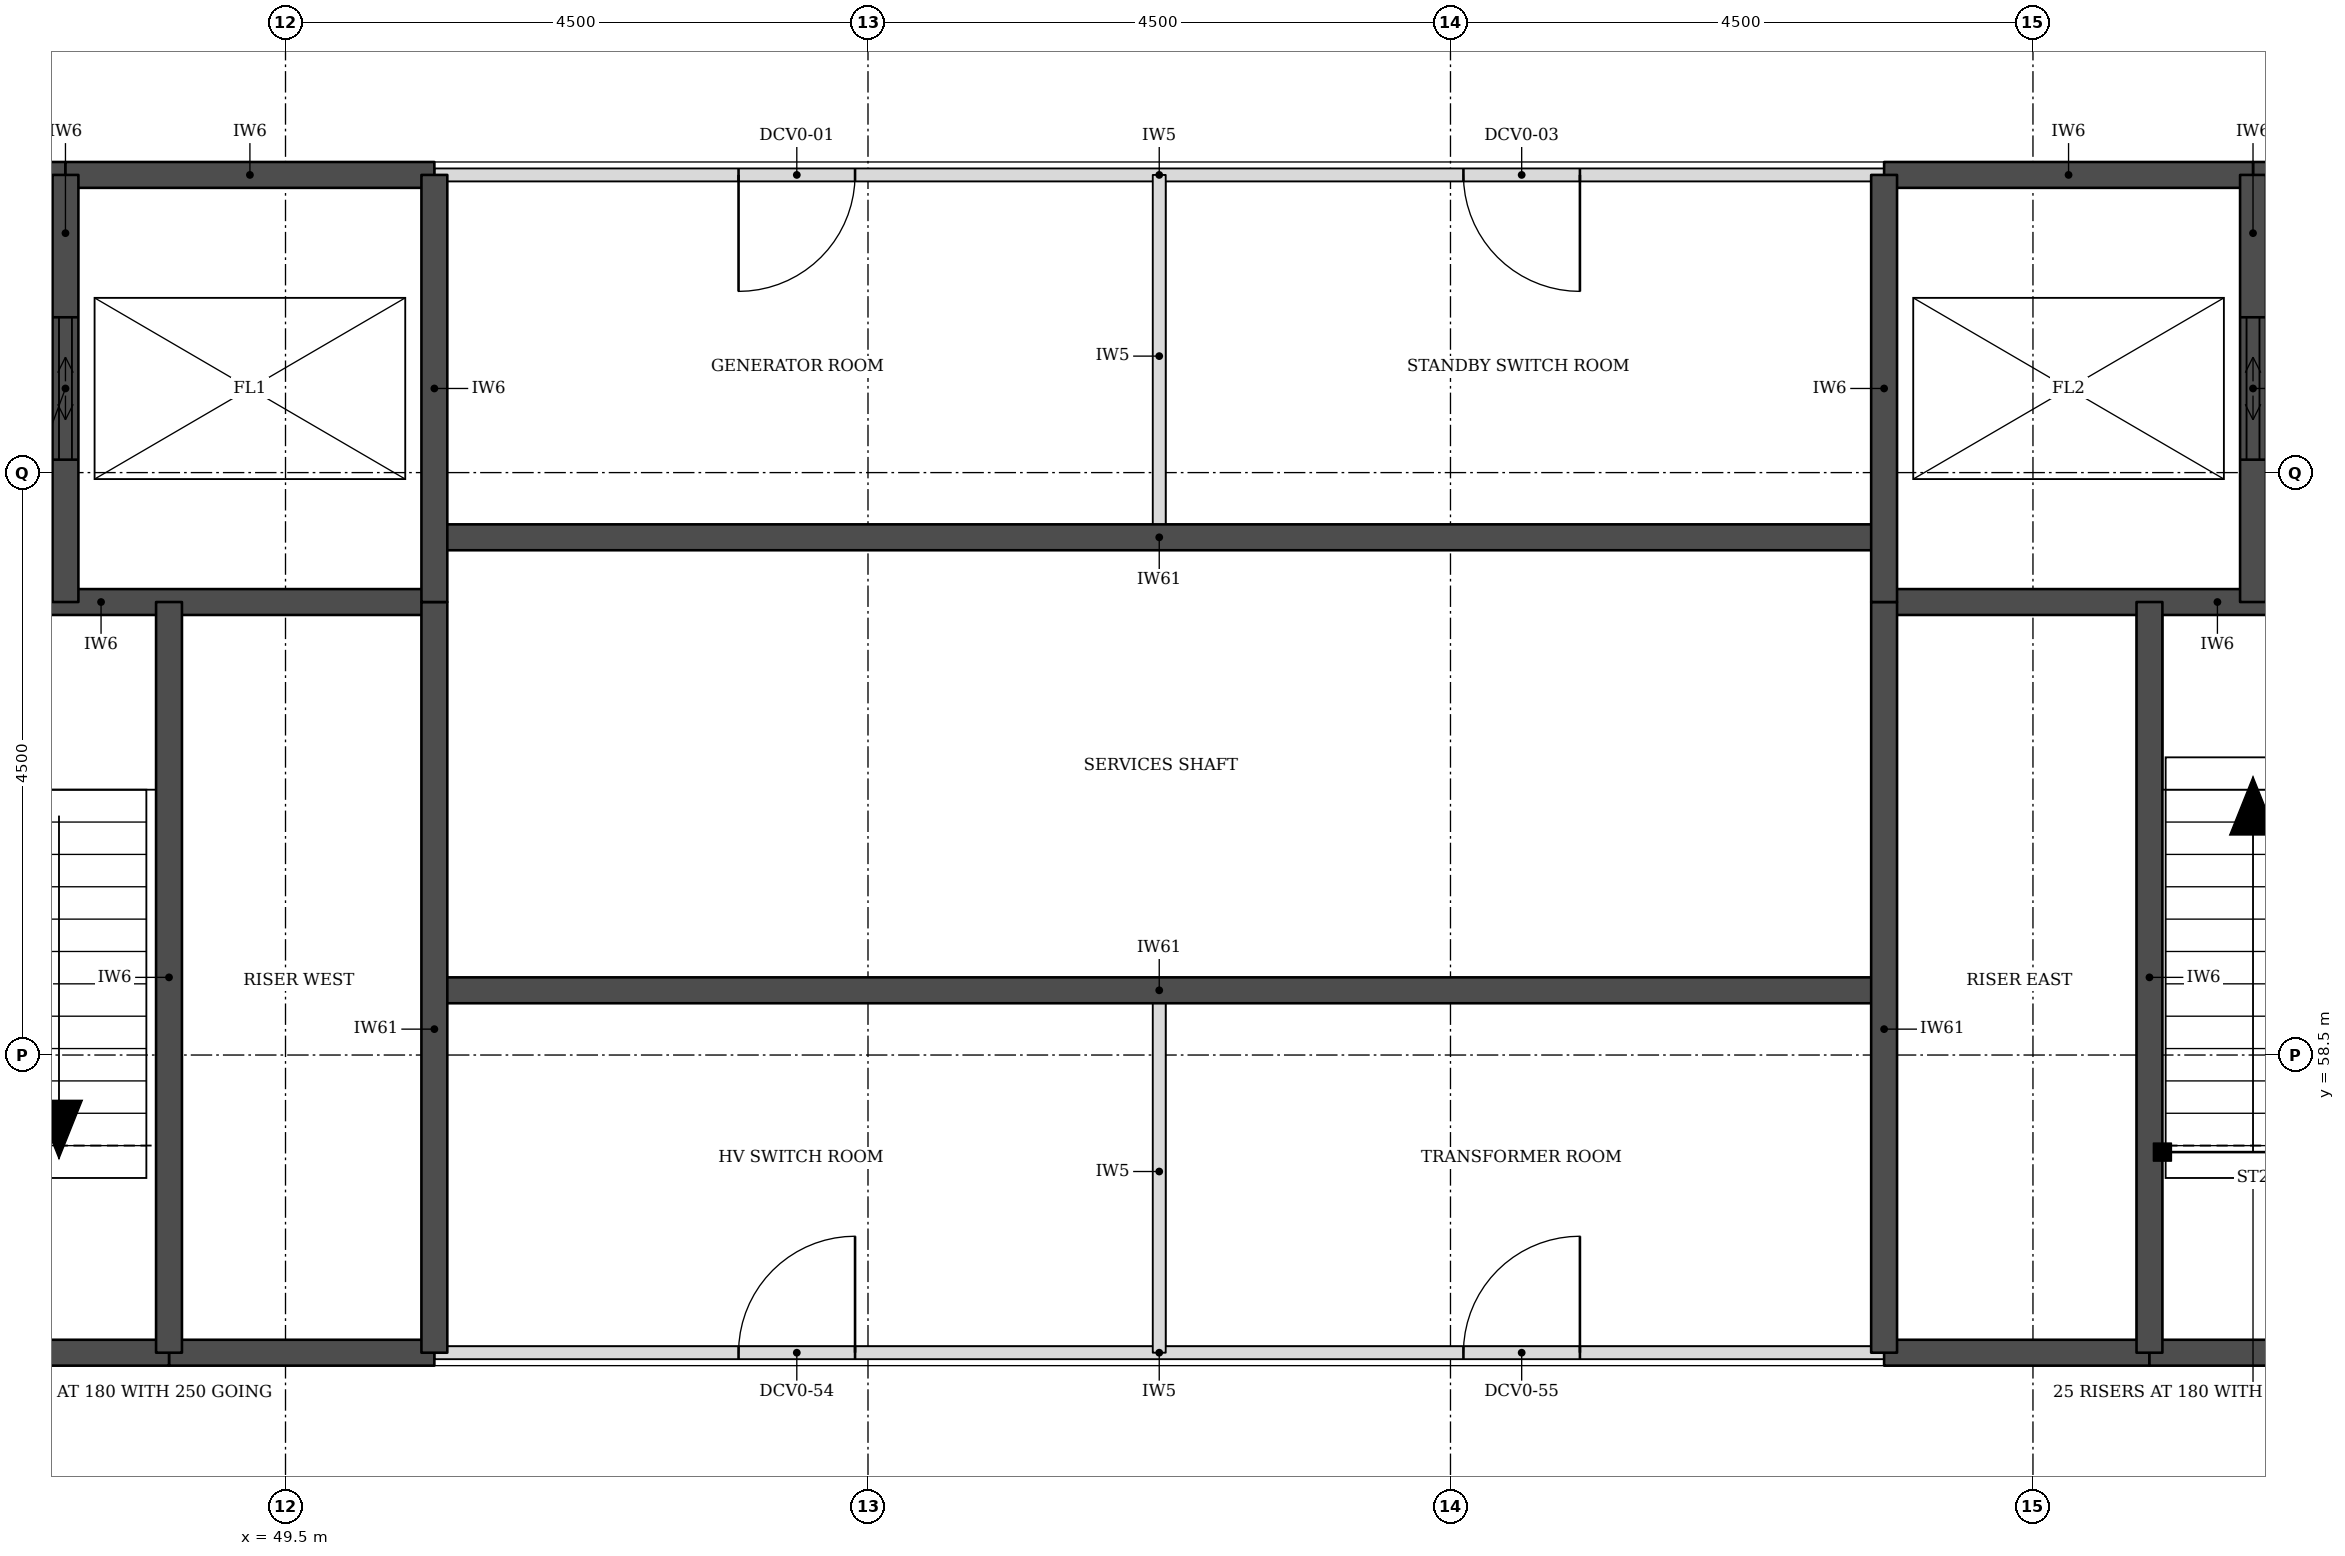
"""IFC4 building model, lengths in metres.
Left out: names, types, materials, properties, quantities, classifications, styles, units other than length and angle.
Written with IfcOpenShell. Run it as: python <this file> out.ifc"""

import sys

from ifc_helpers import new_model, si_unit, direction, frame, frame_2d, origin, place, context, subcontext, project, spatial, rectangle, extrude, element, fill, save


model = new_model("IFC4")
c1 = context("Model", 3, precision=1e-05, world=origin(), true_north=direction((0.0, 1.0)))
c2 = subcontext(c1, "Body", "Model", "MODEL_VIEW")
j1 = project(units=[si_unit("LENGTHUNIT", "METRE"), si_unit("PLANEANGLEUNIT", "RADIAN")], contexts=[c1])
p1 = place(None, origin())
s1 = spatial("IfcSite", under=j1, at=p1, CompositionType="ELEMENT")
p2 = place(p1, origin())
s2 = spatial("IfcBuilding", under=s1, at=p2, CompositionType="ELEMENT")
p3 = place(p2, frame((0.0, 0.0, -4.5)))
s3 = spatial("IfcBuildingStorey", under=s2, at=p3, CompositionType="ELEMENT", Elevation=-4.5)
p4 = place(p3, frame((50.65, 56.2, 0.0), z_axis=(0.0, 0.0, 1.0), x_axis=(1.0, 0.0, 0.0)))
e1 = element("IfcWall", 1, at=p4, inside=s3, PredefinedType="PARTITIONING", context=c2, shape_type="SweptSolid", body=[
    extrude(rectangle(XDim=11.2, YDim=0.1, at=frame_2d((5.6, 0.0))), origin(), (0.0, 0.0, 1.0), 4.1),
])
p5 = place(p4, frame((2.35, 0.0, 0.0)))
e2 = element("IfcOpeningElement", 2, at=p5, cuts=e1, PredefinedType="OPENING", context=c2, shape_type="SweptSolid", body=[
    extrude(rectangle(XDim=0.9, YDim=2.1, at=frame_2d((0.45, 1.05))), frame((0.0, 0.06, 0.0), z_axis=(0.0, -1.0, 0.0), x_axis=(1.0, 0.0, 0.0)), (0.0, 0.0, 1.0), 0.12),
])
p6 = place(p4, frame((7.95, 0.0, 0.0)))
e3 = element("IfcOpeningElement", 3, at=p6, cuts=e1, PredefinedType="OPENING", context=c2, shape_type="SweptSolid", body=[
    extrude(rectangle(XDim=0.9, YDim=2.1, at=frame_2d((0.45, 1.05))), frame((0.0, 0.06, 0.0), z_axis=(0.0, -1.0, 0.0), x_axis=(1.0, 0.0, 0.0)), (0.0, 0.0, 1.0), 0.12),
])
for number, where, z_axis, x_axis in (
    (4, (48.6, 56.2, 0.0), (0.0, 0.0, 1.0), (1.0, 0.0, 0.0)),
    (5, (61.85, 56.2, 0.0), (0.0, 0.0, 1.0), (1.0, 0.0, 0.0)),
):
    element("IfcWall", number, at=place(p3, frame(where, z_axis=z_axis, x_axis=x_axis)), inside=s3, PredefinedType="SOLIDWALL", context=c2, shape_type="SweptSolid", body=[
        extrude(rectangle(XDim=2.05, YDim=0.2, at=frame_2d((1.025, 0.0))), origin(), (0.0, 0.0, 1.0), 4.1),
    ])
for number, where, z_axis, x_axis in (
    (6, (45.5, 56.2, 0.0), (0.0, 0.0, 1.0), (1.0, 0.0, 0.0)),
    (7, (63.9, 56.2, 0.0), (0.0, 0.0, 1.0), (1.0, 0.0, 0.0)),
):
    element("IfcWall", number, at=place(p3, frame(where, z_axis=z_axis, x_axis=x_axis)), inside=s3, PredefinedType="SOLIDWALL", context=c2, shape_type="SweptSolid", body=[
        extrude(rectangle(XDim=3.1, YDim=0.2, at=frame_2d((1.55, 0.0))), origin(), (0.0, 0.0, 1.0), 4.1),
    ])
p7 = place(p3, frame((50.65, 59.0, 0.0), z_axis=(0.0, 0.0, 1.0), x_axis=(1.0, 0.0, 0.0)))
e8 = element("IfcWall", 8, at=p7, inside=s3, PredefinedType="SOLIDWALL", context=c2, shape_type="SweptSolid", body=[
    extrude(rectangle(XDim=11.2, YDim=0.2, at=frame_2d((5.6, 0.0))), origin(), (0.0, 0.0, 1.0), 4.5),
])
for number, where, z_axis, x_axis in (
    (9, (45.5, 62.0, 0.0), (0.0, 0.0, 1.0), (1.0, 0.0, 0.0)),
    (10, (61.85, 62.0, 0.0), (0.0, 0.0, 1.0), (1.0, 0.0, 0.0)),
):
    element("IfcWall", number, at=place(p3, frame(where, z_axis=z_axis, x_axis=x_axis)), inside=s3, PredefinedType="SOLIDWALL", context=c2, shape_type="SweptSolid", body=[
        extrude(rectangle(XDim=5.15, YDim=0.2, at=frame_2d((2.575, 0.0))), origin(), (0.0, 0.0, 1.0), 4.1),
    ])
p8 = place(p3, frame((50.65, 62.5, 0.0), z_axis=(0.0, 0.0, 1.0), x_axis=(1.0, 0.0, 0.0)))
e11 = element("IfcWall", 11, at=p8, inside=s3, PredefinedType="SOLIDWALL", context=c2, shape_type="SweptSolid", body=[
    extrude(rectangle(XDim=11.2, YDim=0.2, at=frame_2d((5.6, 0.0))), origin(), (0.0, 0.0, 1.0), 4.5),
])
p9 = place(p3, frame((50.65, 65.3, 0.0), z_axis=(0.0, 0.0, 1.0), x_axis=(1.0, 0.0, 0.0)))
e12 = element("IfcWall", 12, at=p9, inside=s3, PredefinedType="PARTITIONING", context=c2, shape_type="SweptSolid", body=[
    extrude(rectangle(XDim=11.2, YDim=0.1, at=frame_2d((5.6, 0.0))), origin(), (0.0, 0.0, 1.0), 4.1),
])
p10 = place(p9, frame((2.35, 0.0, 0.0)))
e13 = element("IfcOpeningElement", 13, at=p10, cuts=e12, PredefinedType="OPENING", context=c2, shape_type="SweptSolid", body=[
    extrude(rectangle(XDim=0.9, YDim=2.1, at=frame_2d((0.45, 1.05))), frame((0.0, 0.06, 0.0), z_axis=(0.0, -1.0, 0.0), x_axis=(1.0, 0.0, 0.0)), (0.0, 0.0, 1.0), 0.12),
])
p11 = place(p9, frame((7.95, 0.0, 0.0)))
e14 = element("IfcOpeningElement", 14, at=p11, cuts=e12, PredefinedType="OPENING", context=c2, shape_type="SweptSolid", body=[
    extrude(rectangle(XDim=0.9, YDim=2.1, at=frame_2d((0.45, 1.05))), frame((0.0, 0.06, 0.0), z_axis=(0.0, -1.0, 0.0), x_axis=(1.0, 0.0, 0.0)), (0.0, 0.0, 1.0), 0.12),
])
for number, where, z_axis, x_axis in (
    (15, (45.5, 65.3, 0.0), (0.0, 0.0, 1.0), (1.0, 0.0, 0.0)),
    (16, (64.7, 65.3, 0.0), (0.0, 0.0, 1.0), (1.0, 0.0, 0.0)),
):
    element("IfcWall", number, at=place(p3, frame(where, z_axis=z_axis, x_axis=x_axis)), inside=s3, PredefinedType="SOLIDWALL", context=c2, shape_type="SweptSolid", body=[
        extrude(rectangle(XDim=2.3, YDim=0.2, at=frame_2d((1.15, 0.0))), origin(), (0.0, 0.0, 1.0), 4.1),
    ])
for number, where, z_axis, x_axis in (
    (17, (47.8, 65.3, 0.0), (0.0, 0.0, 1.0), (1.0, 0.0, 0.0)),
    (18, (61.85, 65.3, 0.0), (0.0, 0.0, 1.0), (1.0, 0.0, 0.0)),
):
    element("IfcWall", number, at=place(p3, frame(where, z_axis=z_axis, x_axis=x_axis)), inside=s3, PredefinedType="SOLIDWALL", context=c2, shape_type="SweptSolid", body=[
        extrude(rectangle(XDim=2.85, YDim=0.2, at=frame_2d((1.425, 0.0))), origin(), (0.0, 0.0, 1.0), 4.1),
    ])
p12 = place(p3, frame((47.8, 62.0, 0.0), z_axis=(0.0, 0.0, 1.0), x_axis=(0.0, 1.0, 0.0)))
e19 = element("IfcWall", 19, at=p12, inside=s3, PredefinedType="SOLIDWALL", context=c2, shape_type="SweptSolid", body=[
    extrude(rectangle(XDim=3.3, YDim=0.2, at=frame_2d((1.65, 0.0))), origin(), (0.0, 0.0, 1.0), 4.1),
])
p13 = place(p12, frame((1.1, 0.0, 0.0)))
e20 = element("IfcOpeningElement", 20, at=p13, cuts=e19, PredefinedType="OPENING", context=c2, shape_type="SweptSolid", body=[
    extrude(rectangle(XDim=1.1, YDim=2.1, at=frame_2d((0.55, 1.05))), frame((0.0, 0.11, 0.0), z_axis=(0.0, -1.0, 0.0), x_axis=(1.0, 0.0, 0.0)), (0.0, 0.0, 1.0), 0.22),
])
p14 = place(p3, frame((48.6, 56.2, 0.0), z_axis=(0.0, 0.0, 1.0), x_axis=(0.0, 1.0, 0.0)))
e21 = element("IfcWall", 21, at=p14, inside=s3, PredefinedType="SOLIDWALL", context=c2, shape_type="SweptSolid", body=[
    extrude(rectangle(XDim=5.8, YDim=0.2, at=frame_2d((2.9, 0.0))), origin(), (0.0, 0.0, 1.0), 4.1),
])
p15 = place(p3, frame((50.65, 56.2, 0.0), z_axis=(0.0, 0.0, 1.0), x_axis=(0.0, 1.0, 0.0)))
e22 = element("IfcWall", 22, at=p15, inside=s3, PredefinedType="SOLIDWALL", context=c2, shape_type="SweptSolid", body=[
    extrude(rectangle(XDim=5.8, YDim=0.2, at=frame_2d((2.9, 0.0))), origin(), (0.0, 0.0, 1.0), 4.5),
])
p16 = place(p3, frame((50.65, 62.0, 0.0), z_axis=(0.0, 0.0, 1.0), x_axis=(0.0, 1.0, 0.0)))
e23 = element("IfcWall", 23, at=p16, inside=s3, PredefinedType="SOLIDWALL", context=c2, shape_type="SweptSolid", body=[
    extrude(rectangle(XDim=3.3, YDim=0.2, at=frame_2d((1.65, 0.0))), origin(), (0.0, 0.0, 1.0), 4.1),
])
for number, where, z_axis, x_axis in (
    (24, (56.25, 56.2, 0.0), (0.0, 0.0, 1.0), (0.0, 1.0, 0.0)),
    (25, (56.25, 62.5, 0.0), (0.0, 0.0, 1.0), (0.0, 1.0, 0.0)),
):
    element("IfcWall", number, at=place(p3, frame(where, z_axis=z_axis, x_axis=x_axis)), inside=s3, PredefinedType="PARTITIONING", context=c2, shape_type="SweptSolid", body=[
        extrude(rectangle(XDim=2.8, YDim=0.1, at=frame_2d((1.4, 0.0))), origin(), (0.0, 0.0, 1.0), 4.1),
    ])
p17 = place(p3, frame((61.85, 56.2, 0.0), z_axis=(0.0, 0.0, 1.0), x_axis=(0.0, 1.0, 0.0)))
e26 = element("IfcWall", 26, at=p17, inside=s3, PredefinedType="SOLIDWALL", context=c2, shape_type="SweptSolid", body=[
    extrude(rectangle(XDim=5.8, YDim=0.2, at=frame_2d((2.9, 0.0))), origin(), (0.0, 0.0, 1.0), 4.5),
])
p18 = place(p3, frame((61.85, 62.0, 0.0), z_axis=(0.0, 0.0, 1.0), x_axis=(0.0, 1.0, 0.0)))
e27 = element("IfcWall", 27, at=p18, inside=s3, PredefinedType="SOLIDWALL", context=c2, shape_type="SweptSolid", body=[
    extrude(rectangle(XDim=3.3, YDim=0.2, at=frame_2d((1.65, 0.0))), origin(), (0.0, 0.0, 1.0), 4.1),
])
p19 = place(p3, frame((63.9, 56.2, 0.0), z_axis=(0.0, 0.0, 1.0), x_axis=(0.0, 1.0, 0.0)))
e28 = element("IfcWall", 28, at=p19, inside=s3, PredefinedType="SOLIDWALL", context=c2, shape_type="SweptSolid", body=[
    extrude(rectangle(XDim=5.8, YDim=0.2, at=frame_2d((2.9, 0.0))), origin(), (0.0, 0.0, 1.0), 4.1),
])
p20 = place(p3, frame((64.7, 62.0, 0.0), z_axis=(0.0, 0.0, 1.0), x_axis=(0.0, 1.0, 0.0)))
e29 = element("IfcWall", 29, at=p20, inside=s3, PredefinedType="SOLIDWALL", context=c2, shape_type="SweptSolid", body=[
    extrude(rectangle(XDim=3.3, YDim=0.2, at=frame_2d((1.65, 0.0))), origin(), (0.0, 0.0, 1.0), 4.1),
])
p21 = place(p20, frame((1.1, 0.0, 0.0)))
e30 = element("IfcOpeningElement", 30, at=p21, cuts=e29, PredefinedType="OPENING", context=c2, shape_type="SweptSolid", body=[
    extrude(rectangle(XDim=1.1, YDim=2.1, at=frame_2d((0.55, 1.05))), frame((0.0, 0.11, 0.0), z_axis=(0.0, -1.0, 0.0), x_axis=(1.0, 0.0, 0.0)), (0.0, 0.0, 1.0), 0.22),
])
p22 = place(p13, origin())
e31 = element("IfcDoor", 31, at=p22, inside=s3, OperationType="DOUBLE_DOOR_SLIDING", PredefinedType="DOOR", context=c2, shape_type="SweptSolid", body=[
    extrude(rectangle(XDim=1.1, YDim=2.1, at=frame_2d((0.55, 1.05))), frame((0.0, 0.025, 0.0), z_axis=(0.0, -1.0, 0.0), x_axis=(1.0, 0.0, 0.0)), (0.0, 0.0, 1.0), 0.05),
])
fill(e20, e31)
p23 = place(p21, origin())
e32 = element("IfcDoor", 32, at=p23, inside=s3, OperationType="DOUBLE_DOOR_SLIDING", PredefinedType="DOOR", context=c2, shape_type="SweptSolid", body=[
    extrude(rectangle(XDim=1.1, YDim=2.1, at=frame_2d((0.55, 1.05))), frame((0.0, 0.025, 0.0), z_axis=(0.0, -1.0, 0.0), x_axis=(1.0, 0.0, 0.0)), (0.0, 0.0, 1.0), 0.05),
])
fill(e30, e32)
p24 = place(p5, origin())
e33 = element("IfcDoor", 33, at=p24, inside=s3, OperationType="SINGLE_SWING_RIGHT", PredefinedType="DOOR", context=c2, shape_type="SweptSolid", body=[
    extrude(rectangle(XDim=0.9, YDim=2.1, at=frame_2d((0.45, 1.05))), frame((0.0, 0.025, 0.0), z_axis=(0.0, -1.0, 0.0), x_axis=(1.0, 0.0, 0.0)), (0.0, 0.0, 1.0), 0.05),
])
fill(e2, e33)
p25 = place(p6, origin())
e34 = element("IfcDoor", 34, at=p25, inside=s3, OperationType="SINGLE_SWING_RIGHT", PredefinedType="DOOR", context=c2, shape_type="SweptSolid", body=[
    extrude(rectangle(XDim=0.9, YDim=2.1, at=frame_2d((0.45, 1.05))), frame((0.0, 0.025, 0.0), z_axis=(0.0, -1.0, 0.0), x_axis=(1.0, 0.0, 0.0)), (0.0, 0.0, 1.0), 0.05),
])
fill(e3, e34)
p26 = place(p10, frame((0.9, 0.0, 0.0), z_axis=(0.0, 0.0, 1.0), x_axis=(-1.0, 0.0, 0.0)))
e35 = element("IfcDoor", 35, at=p26, inside=s3, OperationType="SINGLE_SWING_RIGHT", PredefinedType="DOOR", context=c2, shape_type="SweptSolid", body=[
    extrude(rectangle(XDim=0.9, YDim=2.1, at=frame_2d((0.45, 1.05))), frame((0.0, 0.025, 0.0), z_axis=(0.0, -1.0, 0.0), x_axis=(1.0, 0.0, 0.0)), (0.0, 0.0, 1.0), 0.05),
])
fill(e13, e35)
p27 = place(p11, frame((0.9, 0.0, 0.0), z_axis=(0.0, 0.0, 1.0), x_axis=(-1.0, 0.0, 0.0)))
e36 = element("IfcDoor", 36, at=p27, inside=s3, OperationType="SINGLE_SWING_LEFT", PredefinedType="DOOR", context=c2, shape_type="SweptSolid", body=[
    extrude(rectangle(XDim=0.9, YDim=2.1, at=frame_2d((0.45, 1.05))), frame((0.0, 0.025, 0.0), z_axis=(0.0, -1.0, 0.0), x_axis=(1.0, 0.0, 0.0)), (0.0, 0.0, 1.0), 0.05),
])
fill(e14, e36)
save(model, sys.argv[1])
